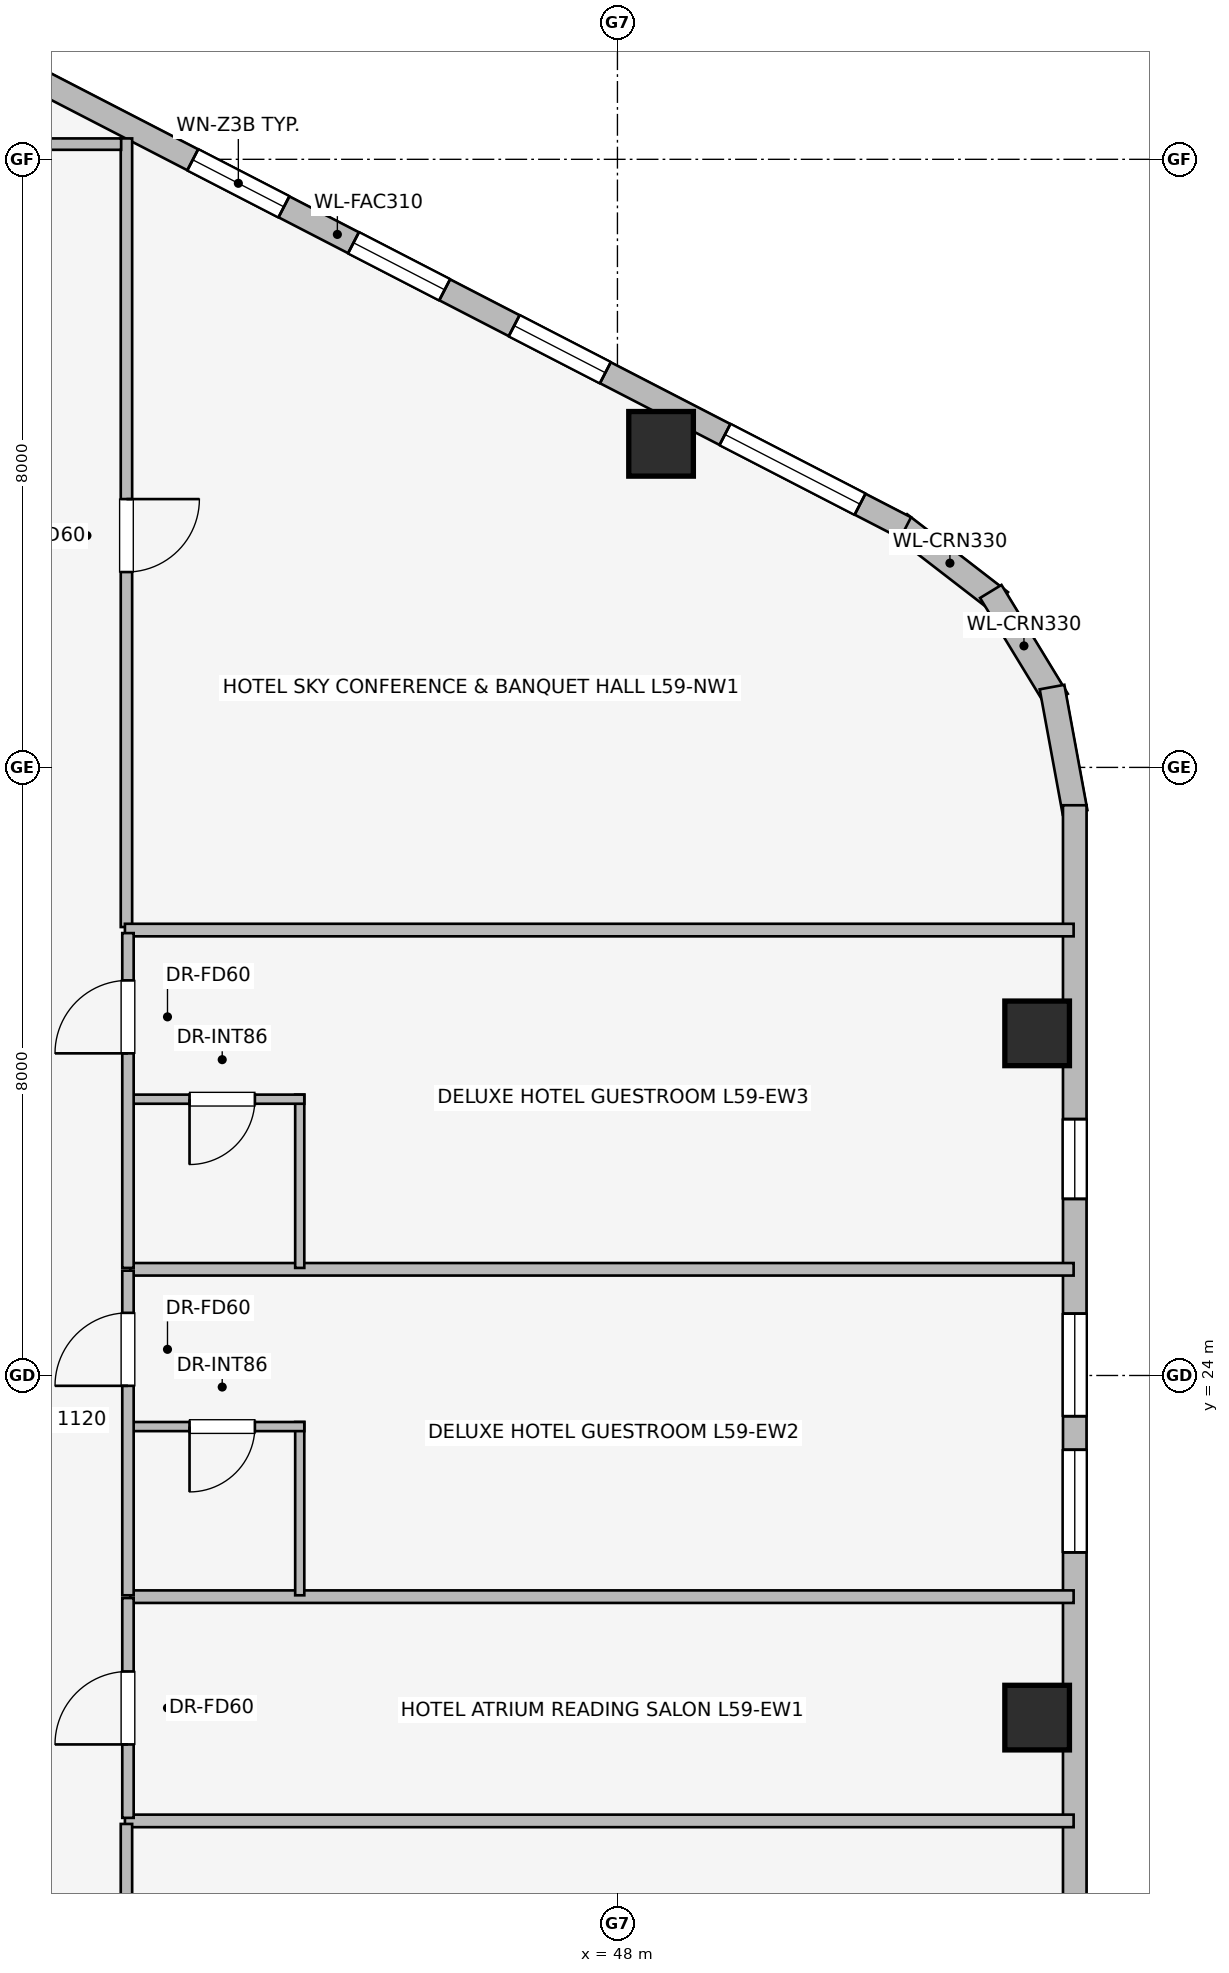
"""IFC4 building model, lengths in metres.
Left out: names, types, materials, properties, quantities, classifications, styles, units other than length and angle.
Written with IfcOpenShell. Run it as: python <this file> out.ifc"""

import sys

from ifc_helpers import new_model, si_unit, direction, frame, frame_2d, origin, origin_2d, place, context, subcontext, project, spatial, rectangle, extrude, element, fill, save


model = new_model("IFC4")
c1 = context("Model", 3, precision=1e-05, world=origin(), true_north=direction((0.0, 1.0)))
c2 = subcontext(c1, "Body", "Model", "MODEL_VIEW")
j1 = project(units=[si_unit("LENGTHUNIT", "METRE"), si_unit("PLANEANGLEUNIT", "RADIAN")], contexts=[c1])
p1 = place(None, origin())
s1 = spatial("IfcSite", under=j1, at=p1, CompositionType="ELEMENT")
p2 = place(p1, origin())
s2 = spatial("IfcBuilding", under=s1, at=p2, CompositionType="ELEMENT")
p3 = place(p2, frame((0.0, 0.0, 217.15)))
s3 = spatial("IfcBuildingStorey", under=s2, at=p3, CompositionType="ELEMENT", Elevation=217.15)
for number, where, z_axis, x_axis in (
    (1, (48.574, 36.257, 0.0), (0.0, 0.0, 1.0), (1.0, 0.0, 0.0)),
    (2, (53.522, 19.499, 0.0), (0.0, 0.0, 1.0), (1.0, 0.0, 0.0)),
    (3, (53.522, 28.501, 0.0), (0.0, 0.0, 1.0), (1.0, 0.0, 0.0)),
):
    element("IfcColumn", number, at=place(p3, frame(where, z_axis=z_axis, x_axis=x_axis)), inside=s3, PredefinedType="COLUMN", context=c2, shape_type="SweptSolid", body=[
        extrude(rectangle(XDim=0.85, YDim=0.85, at=origin_2d()), origin(), (0.0, 0.0, 1.0), 3.45),
    ])
p4 = place(p3, frame((51.711, 35.2, 0.0), z_axis=(0.0, 0.0, 1.0), x_axis=(0.791464279355, -0.611215423976, 0.0)))
e4 = element("IfcWall", 4, at=p4, inside=s3, PredefinedType="STANDARD", context=c2, shape_type="SweptSolid", body=[
    extrude(rectangle(XDim=1.677, YDim=0.33, at=frame_2d((0.838, 0.0))), origin(), (0.0, 0.0, 1.0), 3.03),
])
p5 = place(p3, frame((52.912, 34.315, 0.0), z_axis=(0.0, 0.0, 1.0), x_axis=(0.520219286058, -0.85403272444, 0.0)))
e5 = element("IfcWall", 5, at=p5, inside=s3, PredefinedType="STANDARD", context=c2, shape_type="SweptSolid", body=[
    extrude(rectangle(XDim=1.678, YDim=0.33, at=frame_2d((0.839, 0.0))), origin(), (0.0, 0.0, 1.0), 3.03),
])
p6 = place(p3, frame((53.718, 33.057, 0.0), z_axis=(0.0, 0.0, 1.0), x_axis=(0.180717642671, -0.983535019014, 0.0)))
e6 = element("IfcWall", 6, at=p6, inside=s3, PredefinedType="STANDARD", context=c2, shape_type="SweptSolid", body=[
    extrude(rectangle(XDim=1.677, YDim=0.33, at=frame_2d((0.838, 0.0))), origin(), (0.0, 0.0, 1.0), 3.03),
])
p7 = place(p3, frame((36.838, 42.871, 0.0), z_axis=(0.0, 0.0, 1.0), x_axis=(0.888626188278, -0.458632202867, 0.0)))
e7 = element("IfcWall", 7, at=p7, inside=s3, PredefinedType="STANDARD", context=c2, shape_type="SweptSolid", body=[
    extrude(rectangle(XDim=16.828, YDim=0.31, at=frame_2d((8.414, 0.0))), origin(), (0.0, 0.0, 1.0), 3.03),
])
p8 = place(p7, frame((0.675, 0.0, 0.75)))
e8 = element("IfcOpeningElement", 8, at=p8, cuts=e7, PredefinedType="OPENING", context=c2, shape_type="SweptSolid", body=[
    extrude(rectangle(XDim=2.0, YDim=1.5, at=frame_2d((1.0, 0.75))), frame((0.0, 0.165, 0.0), z_axis=(0.0, -1.0, 0.0), x_axis=(1.0, 0.0, 0.0)), (0.0, 0.0, 1.0), 0.33),
])
p9 = place(p7, frame((6.273, 0.0, 0.75)))
e9 = element("IfcOpeningElement", 9, at=p9, cuts=e7, PredefinedType="OPENING", context=c2, shape_type="SweptSolid", body=[
    extrude(rectangle(XDim=1.35, YDim=1.45, at=frame_2d((0.675, 0.725))), frame((0.0, 0.165, 0.0), z_axis=(0.0, -1.0, 0.0), x_axis=(1.0, 0.0, 0.0)), (0.0, 0.0, 1.0), 0.33),
])
p10 = place(p7, frame((8.653, 0.0, 0.75)))
e10 = element("IfcOpeningElement", 10, at=p10, cuts=e7, PredefinedType="OPENING", context=c2, shape_type="SweptSolid", body=[
    extrude(rectangle(XDim=1.35, YDim=1.45, at=frame_2d((0.675, 0.725))), frame((0.0, 0.165, 0.0), z_axis=(0.0, -1.0, 0.0), x_axis=(1.0, 0.0, 0.0)), (0.0, 0.0, 1.0), 0.33),
])
p11 = place(p7, frame((11.032, 0.0, 0.75)))
e11 = element("IfcOpeningElement", 11, at=p11, cuts=e7, PredefinedType="OPENING", context=c2, shape_type="SweptSolid", body=[
    extrude(rectangle(XDim=1.35, YDim=1.45, at=frame_2d((0.675, 0.725))), frame((0.0, 0.165, 0.0), z_axis=(0.0, -1.0, 0.0), x_axis=(1.0, 0.0, 0.0)), (0.0, 0.0, 1.0), 0.33),
])
p12 = place(p7, frame((14.153, 0.0, 0.75)))
e12 = element("IfcOpeningElement", 12, at=p12, cuts=e7, PredefinedType="OPENING", context=c2, shape_type="SweptSolid", body=[
    extrude(rectangle(XDim=2.0, YDim=1.5, at=frame_2d((1.0, 0.75))), frame((0.0, 0.165, 0.0), z_axis=(0.0, -1.0, 0.0), x_axis=(1.0, 0.0, 0.0)), (0.0, 0.0, 1.0), 0.33),
])
p13 = place(p3, frame((54.017, 31.502, 0.0), z_axis=(0.0, 0.0, 1.0), x_axis=(0.0, -1.0, 0.0)))
e13 = element("IfcWall", 13, at=p13, inside=s3, PredefinedType="STANDARD", context=c2, shape_type="SweptSolid", body=[
    extrude(rectangle(XDim=15.004, YDim=0.31, at=frame_2d((7.502, 0.0))), origin(), (0.0, 0.0, 1.0), 3.03),
])
p14 = place(p13, frame((4.129, 0.0, 0.75)))
e14 = element("IfcOpeningElement", 14, at=p14, cuts=e13, PredefinedType="OPENING", context=c2, shape_type="SweptSolid", body=[
    extrude(rectangle(XDim=1.05, YDim=1.4, at=frame_2d((0.525, 0.7))), frame((0.0, 0.165, 0.0), z_axis=(0.0, -1.0, 0.0), x_axis=(1.0, 0.0, 0.0)), (0.0, 0.0, 1.0), 0.33),
])
p15 = place(p13, frame((6.688, 0.0, 0.75)))
e15 = element("IfcOpeningElement", 15, at=p15, cuts=e13, PredefinedType="OPENING", context=c2, shape_type="SweptSolid", body=[
    extrude(rectangle(XDim=1.35, YDim=1.45, at=frame_2d((0.675, 0.725))), frame((0.0, 0.165, 0.0), z_axis=(0.0, -1.0, 0.0), x_axis=(1.0, 0.0, 0.0)), (0.0, 0.0, 1.0), 0.33),
])
p16 = place(p13, frame((8.479, 0.0, 0.75)))
e16 = element("IfcOpeningElement", 16, at=p16, cuts=e13, PredefinedType="OPENING", context=c2, shape_type="SweptSolid", body=[
    extrude(rectangle(XDim=1.35, YDim=1.45, at=frame_2d((0.675, 0.725))), frame((0.0, 0.165, 0.0), z_axis=(0.0, -1.0, 0.0), x_axis=(1.0, 0.0, 0.0)), (0.0, 0.0, 1.0), 0.33),
])
p17 = place(p3, frame((41.54, 40.275, 0.0), z_axis=(0.0, 0.0, 1.0), x_axis=(0.0, -1.0, 0.0)))
e17 = element("IfcWall", 17, at=p17, inside=s3, PredefinedType="PARTITIONING", context=c2, shape_type="SweptSolid", body=[
    extrude(rectangle(XDim=10.375, YDim=0.15, at=frame_2d((5.188, 0.0))), origin(), (0.0, 0.0, 1.0), 3.03),
])
p18 = place(p17, frame((4.745, 0.0, 0.0)))
e18 = element("IfcOpeningElement", 18, at=p18, cuts=e17, PredefinedType="OPENING", context=c2, shape_type="SweptSolid", body=[
    extrude(rectangle(XDim=0.96, YDim=2.0, at=frame_2d((0.48, 1.0))), frame((0.0, 0.085, 0.0), z_axis=(0.0, -1.0, 0.0), x_axis=(1.0, 0.0, 0.0)), (0.0, 0.0, 1.0), 0.17),
])
for number, where, z_axis, x_axis in (
    (19, (41.52, 18.14, 0.0), (0.0, 0.0, 1.0), (1.0, 0.0, 0.0)),
    (20, (41.52, 29.86, 0.0), (0.0, 0.0, 1.0), (1.0, 0.0, 0.0)),
):
    element("IfcWall", number, at=place(p3, frame(where, z_axis=z_axis, x_axis=x_axis)), inside=s3, PredefinedType="PARTITIONING", context=c2, shape_type="SweptSolid", body=[
        extrude(rectangle(XDim=12.482, YDim=0.165, at=frame_2d((6.241, 0.0))), origin(), (0.0, 0.0, 1.0), 3.03),
    ])
for number, where, z_axis, x_axis in (
    (21, (41.59, 21.09, 0.0), (0.0, 0.0, 1.0), (1.0, 0.0, 0.0)),
    (22, (41.59, 25.397, 0.0), (0.0, 0.0, 1.0), (1.0, 0.0, 0.0)),
):
    element("IfcWall", number, at=place(p3, frame(where, z_axis=z_axis, x_axis=x_axis)), inside=s3, PredefinedType="PARTITIONING", context=c2, shape_type="SweptSolid", body=[
        extrude(rectangle(XDim=12.412, YDim=0.165, at=frame_2d((6.206, 0.0))), origin(), (0.0, 0.0, 1.0), 3.03),
    ])
p19 = place(p3, frame((41.56, 18.18, 0.0), z_axis=(0.0, 0.0, 1.0), x_axis=(0.0, 1.0, 0.0)))
e23 = element("IfcWall", 23, at=p19, inside=s3, PredefinedType="PARTITIONING", context=c2, shape_type="SweptSolid", body=[
    extrude(rectangle(XDim=2.892, YDim=0.15, at=frame_2d((1.446, 0.0))), origin(), (0.0, 0.0, 1.0), 3.03),
])
p20 = place(p19, frame((0.966, 0.0, 0.0)))
e24 = element("IfcOpeningElement", 24, at=p20, cuts=e23, PredefinedType="OPENING", context=c2, shape_type="SweptSolid", body=[
    extrude(rectangle(XDim=0.96, YDim=2.0, at=frame_2d((0.48, 1.0))), frame((0.0, 0.085, 0.0), z_axis=(0.0, -1.0, 0.0), x_axis=(1.0, 0.0, 0.0)), (0.0, 0.0, 1.0), 0.17),
])
p21 = place(p3, frame((43.82, 21.108, 0.0), z_axis=(0.0, 0.0, 1.0), x_axis=(0.0, 1.0, 0.0)))
e25 = element("IfcWall", 25, at=p21, inside=s3, PredefinedType="PARTITIONING", context=c2, shape_type="SweptSolid", body=[
    extrude(rectangle(XDim=2.28, YDim=0.12, at=frame_2d((1.14, 0.0))), origin(), (0.0, 0.0, 1.0), 3.03),
])
p22 = place(p3, frame((43.88, 23.328, 0.0), z_axis=(0.0, 0.0, 1.0), x_axis=(-1.0, 0.0, 0.0)))
e26 = element("IfcWall", 26, at=p22, inside=s3, PredefinedType="PARTITIONING", context=c2, shape_type="SweptSolid", body=[
    extrude(rectangle(XDim=2.32, YDim=0.12, at=frame_2d((1.16, 0.0))), origin(), (0.0, 0.0, 1.0), 3.03),
])
p23 = place(p22, frame((0.65, 0.0, 0.0)))
e27 = element("IfcOpeningElement", 27, at=p23, cuts=e26, PredefinedType="OPENING", context=c2, shape_type="SweptSolid", body=[
    extrude(rectangle(XDim=0.86, YDim=2.0, at=frame_2d((0.43, 1.0))), frame((0.0, 0.07, 0.0), z_axis=(0.0, -1.0, 0.0), x_axis=(1.0, 0.0, 0.0)), (0.0, 0.0, 1.0), 0.14),
])
p24 = place(p3, frame((41.56, 21.108, 0.0), z_axis=(0.0, 0.0, 1.0), x_axis=(0.0, 1.0, 0.0)))
e28 = element("IfcWall", 28, at=p24, inside=s3, PredefinedType="PARTITIONING", context=c2, shape_type="SweptSolid", body=[
    extrude(rectangle(XDim=4.271, YDim=0.15, at=frame_2d((2.135, 0.0))), origin(), (0.0, 0.0, 1.0), 3.03),
])
p25 = place(p24, frame((2.756, 0.0, 0.0)))
e29 = element("IfcOpeningElement", 29, at=p25, cuts=e28, PredefinedType="OPENING", context=c2, shape_type="SweptSolid", body=[
    extrude(rectangle(XDim=0.96, YDim=2.0, at=frame_2d((0.48, 1.0))), frame((0.0, 0.085, 0.0), z_axis=(0.0, -1.0, 0.0), x_axis=(1.0, 0.0, 0.0)), (0.0, 0.0, 1.0), 0.17),
])
p26 = place(p3, frame((43.82, 25.415, 0.0), z_axis=(0.0, 0.0, 1.0), x_axis=(0.0, 1.0, 0.0)))
e30 = element("IfcWall", 30, at=p26, inside=s3, PredefinedType="PARTITIONING", context=c2, shape_type="SweptSolid", body=[
    extrude(rectangle(XDim=2.28, YDim=0.12, at=frame_2d((1.14, 0.0))), origin(), (0.0, 0.0, 1.0), 3.03),
])
p27 = place(p3, frame((43.88, 27.635, 0.0), z_axis=(0.0, 0.0, 1.0), x_axis=(-1.0, 0.0, 0.0)))
e31 = element("IfcWall", 31, at=p27, inside=s3, PredefinedType="PARTITIONING", context=c2, shape_type="SweptSolid", body=[
    extrude(rectangle(XDim=2.32, YDim=0.12, at=frame_2d((1.16, 0.0))), origin(), (0.0, 0.0, 1.0), 3.03),
])
p28 = place(p27, frame((0.65, 0.0, 0.0)))
e32 = element("IfcOpeningElement", 32, at=p28, cuts=e31, PredefinedType="OPENING", context=c2, shape_type="SweptSolid", body=[
    extrude(rectangle(XDim=0.86, YDim=2.0, at=frame_2d((0.43, 1.0))), frame((0.0, 0.07, 0.0), z_axis=(0.0, -1.0, 0.0), x_axis=(1.0, 0.0, 0.0)), (0.0, 0.0, 1.0), 0.14),
])
p29 = place(p3, frame((41.56, 25.415, 0.0), z_axis=(0.0, 0.0, 1.0), x_axis=(0.0, 1.0, 0.0)))
e33 = element("IfcWall", 33, at=p29, inside=s3, PredefinedType="PARTITIONING", context=c2, shape_type="SweptSolid", body=[
    extrude(rectangle(XDim=4.405, YDim=0.15, at=frame_2d((2.203, 0.0))), origin(), (0.0, 0.0, 1.0), 3.03),
])
p30 = place(p29, frame((2.823, 0.0, 0.0)))
e34 = element("IfcOpeningElement", 34, at=p30, cuts=e33, PredefinedType="OPENING", context=c2, shape_type="SweptSolid", body=[
    extrude(rectangle(XDim=0.96, YDim=2.0, at=frame_2d((0.48, 1.0))), frame((0.0, 0.085, 0.0), z_axis=(0.0, -1.0, 0.0), x_axis=(1.0, 0.0, 0.0)), (0.0, 0.0, 1.0), 0.17),
])
p31 = place(p3, frame((41.54, 14.019, 0.0), z_axis=(0.0, 0.0, 1.0), x_axis=(0.0, 1.0, 0.0)))
e35 = element("IfcWall", 35, at=p31, inside=s3, PredefinedType="PARTITIONING", context=c2, shape_type="SweptSolid", body=[
    extrude(rectangle(XDim=4.081, YDim=0.15, at=frame_2d((2.041, 0.0))), origin(), (0.0, 0.0, 1.0), 3.03),
])
p32 = place(p31, frame((1.561, 0.0, 0.0)))
e36 = element("IfcOpeningElement", 36, at=p32, cuts=e35, PredefinedType="OPENING", context=c2, shape_type="SweptSolid", body=[
    extrude(rectangle(XDim=0.96, YDim=2.0, at=frame_2d((0.48, 1.0))), frame((0.0, 0.085, 0.0), z_axis=(0.0, -1.0, 0.0), x_axis=(1.0, 0.0, 0.0)), (0.0, 0.0, 1.0), 0.17),
])
p33 = place(p3, frame((39.958, 40.2, 0.0), z_axis=(0.0, 0.0, 1.0), x_axis=(1.0, 0.0, 0.0)))
e37 = element("IfcWall", 37, at=p33, inside=s3, PredefinedType="PARTITIONING", context=c2, shape_type="SweptSolid", body=[
    extrude(rectangle(XDim=1.512, YDim=0.15, at=frame_2d((0.756, 0.0))), origin(), (0.0, 0.0, 1.0), 3.03),
])
p34 = place(p9, origin())
e38 = element("IfcWindow", 38, at=p34, inside=s3, PartitioningType="SINGLE_PANEL", PredefinedType="WINDOW", context=c2, shape_type="SweptSolid", body=[
    extrude(rectangle(XDim=1.35, YDim=1.45, at=frame_2d((0.675, 0.725))), frame((0.0, 0.03, 0.0), z_axis=(0.0, -1.0, 0.0), x_axis=(1.0, 0.0, 0.0)), (0.0, 0.0, 1.0), 0.06),
])
fill(e9, e38)
p35 = place(p10, origin())
e39 = element("IfcWindow", 39, at=p35, inside=s3, PartitioningType="SINGLE_PANEL", PredefinedType="WINDOW", context=c2, shape_type="SweptSolid", body=[
    extrude(rectangle(XDim=1.35, YDim=1.45, at=frame_2d((0.675, 0.725))), frame((0.0, 0.03, 0.0), z_axis=(0.0, -1.0, 0.0), x_axis=(1.0, 0.0, 0.0)), (0.0, 0.0, 1.0), 0.06),
])
fill(e10, e39)
p36 = place(p11, origin())
e40 = element("IfcWindow", 40, at=p36, inside=s3, PartitioningType="SINGLE_PANEL", PredefinedType="WINDOW", context=c2, shape_type="SweptSolid", body=[
    extrude(rectangle(XDim=1.35, YDim=1.45, at=frame_2d((0.675, 0.725))), frame((0.0, 0.03, 0.0), z_axis=(0.0, -1.0, 0.0), x_axis=(1.0, 0.0, 0.0)), (0.0, 0.0, 1.0), 0.06),
])
fill(e11, e40)
p37 = place(p12, origin())
e41 = element("IfcWindow", 41, at=p37, inside=s3, PartitioningType="SINGLE_PANEL", PredefinedType="WINDOW", context=c2, shape_type="SweptSolid", body=[
    extrude(rectangle(XDim=2.0, YDim=1.5, at=frame_2d((1.0, 0.75))), frame((0.0, 0.03, 0.0), z_axis=(0.0, -1.0, 0.0), x_axis=(1.0, 0.0, 0.0)), (0.0, 0.0, 1.0), 0.06),
])
fill(e12, e41)
p38 = place(p14, origin())
e42 = element("IfcWindow", 42, at=p38, inside=s3, PartitioningType="SINGLE_PANEL", PredefinedType="WINDOW", context=c2, shape_type="SweptSolid", body=[
    extrude(rectangle(XDim=1.05, YDim=1.4, at=frame_2d((0.525, 0.7))), frame((0.0, 0.03, 0.0), z_axis=(0.0, -1.0, 0.0), x_axis=(1.0, 0.0, 0.0)), (0.0, 0.0, 1.0), 0.06),
])
fill(e14, e42)
p39 = place(p15, origin())
e43 = element("IfcWindow", 43, at=p39, inside=s3, PartitioningType="SINGLE_PANEL", PredefinedType="WINDOW", context=c2, shape_type="SweptSolid", body=[
    extrude(rectangle(XDim=1.35, YDim=1.45, at=frame_2d((0.675, 0.725))), frame((0.0, 0.03, 0.0), z_axis=(0.0, -1.0, 0.0), x_axis=(1.0, 0.0, 0.0)), (0.0, 0.0, 1.0), 0.06),
])
fill(e15, e43)
p40 = place(p16, origin())
e44 = element("IfcWindow", 44, at=p40, inside=s3, PartitioningType="SINGLE_PANEL", PredefinedType="WINDOW", context=c2, shape_type="SweptSolid", body=[
    extrude(rectangle(XDim=1.35, YDim=1.45, at=frame_2d((0.675, 0.725))), frame((0.0, 0.03, 0.0), z_axis=(0.0, -1.0, 0.0), x_axis=(1.0, 0.0, 0.0)), (0.0, 0.0, 1.0), 0.06),
])
fill(e16, e44)
p41 = place(p18, origin())
e45 = element("IfcDoor", 45, at=p41, inside=s3, OperationType="SINGLE_SWING_LEFT", PredefinedType="DOOR", context=c2, shape_type="SweptSolid", body=[
    extrude(rectangle(XDim=0.96, YDim=2.0, at=frame_2d((0.48, 1.0))), frame((0.0, 0.025, 0.0), z_axis=(0.0, -1.0, 0.0), x_axis=(1.0, 0.0, 0.0)), (0.0, 0.0, 1.0), 0.05),
])
fill(e18, e45)
p42 = place(p20, origin())
e46 = element("IfcDoor", 46, at=p42, inside=s3, OperationType="SINGLE_SWING_LEFT", PredefinedType="DOOR", context=c2, shape_type="SweptSolid", body=[
    extrude(rectangle(XDim=0.96, YDim=2.0, at=frame_2d((0.48, 1.0))), frame((0.0, 0.025, 0.0), z_axis=(0.0, -1.0, 0.0), x_axis=(1.0, 0.0, 0.0)), (0.0, 0.0, 1.0), 0.05),
])
fill(e24, e46)
p43 = place(p23, origin())
e47 = element("IfcDoor", 47, at=p43, inside=s3, OperationType="SINGLE_SWING_RIGHT", PredefinedType="DOOR", context=c2, shape_type="SweptSolid", body=[
    extrude(rectangle(XDim=0.86, YDim=2.0, at=frame_2d((0.43, 1.0))), frame((0.0, 0.025, 0.0), z_axis=(0.0, -1.0, 0.0), x_axis=(1.0, 0.0, 0.0)), (0.0, 0.0, 1.0), 0.05),
])
fill(e27, e47)
p44 = place(p25, origin())
e48 = element("IfcDoor", 48, at=p44, inside=s3, OperationType="SINGLE_SWING_LEFT", PredefinedType="DOOR", context=c2, shape_type="SweptSolid", body=[
    extrude(rectangle(XDim=0.96, YDim=2.0, at=frame_2d((0.48, 1.0))), frame((0.0, 0.025, 0.0), z_axis=(0.0, -1.0, 0.0), x_axis=(1.0, 0.0, 0.0)), (0.0, 0.0, 1.0), 0.05),
])
fill(e29, e48)
p45 = place(p28, origin())
e49 = element("IfcDoor", 49, at=p45, inside=s3, OperationType="SINGLE_SWING_RIGHT", PredefinedType="DOOR", context=c2, shape_type="SweptSolid", body=[
    extrude(rectangle(XDim=0.86, YDim=2.0, at=frame_2d((0.43, 1.0))), frame((0.0, 0.025, 0.0), z_axis=(0.0, -1.0, 0.0), x_axis=(1.0, 0.0, 0.0)), (0.0, 0.0, 1.0), 0.05),
])
fill(e32, e49)
p46 = place(p30, origin())
e50 = element("IfcDoor", 50, at=p46, inside=s3, OperationType="SINGLE_SWING_LEFT", PredefinedType="DOOR", context=c2, shape_type="SweptSolid", body=[
    extrude(rectangle(XDim=0.96, YDim=2.0, at=frame_2d((0.48, 1.0))), frame((0.0, 0.025, 0.0), z_axis=(0.0, -1.0, 0.0), x_axis=(1.0, 0.0, 0.0)), (0.0, 0.0, 1.0), 0.05),
])
fill(e34, e50)
save(model, sys.argv[1])
